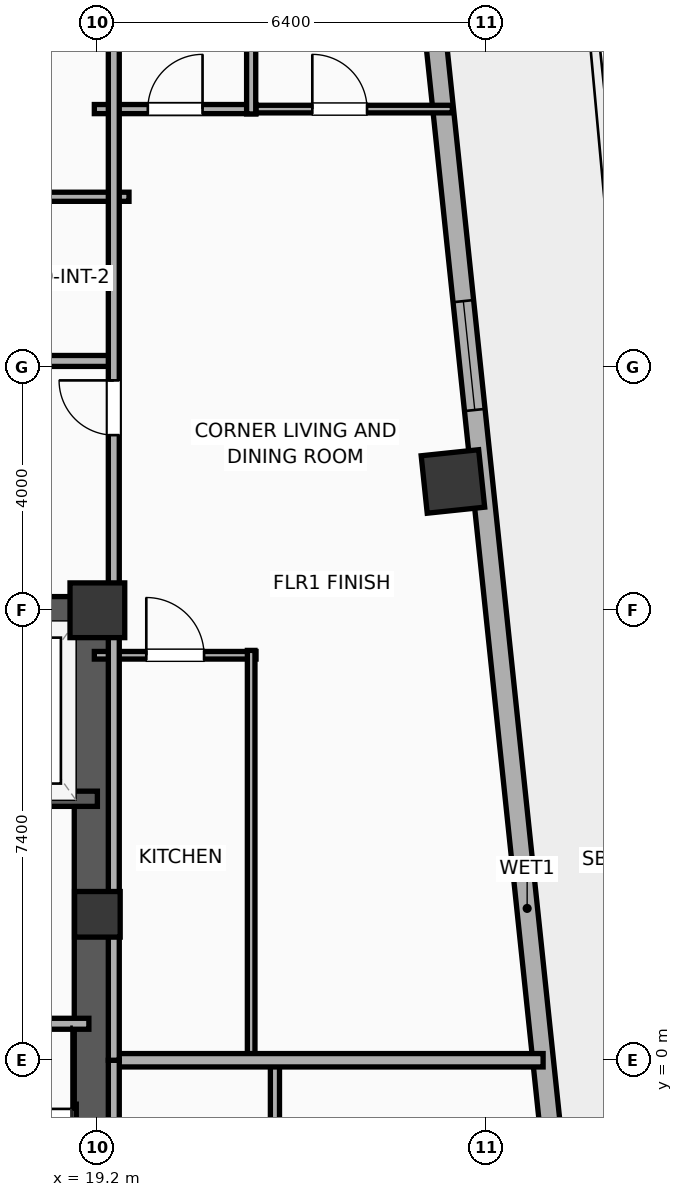
"""IFC4 building model, lengths in metres.
Left out: names, types, materials, properties, quantities, classifications, styles, units other than length and angle.
Written with IfcOpenShell. Run it as: python <this file> out.ifc"""

import sys

from ifc_helpers import new_model, si_unit, direction, frame, frame_2d, origin, origin_2d, place, context, subcontext, project, spatial, rectangle, hollow_rectangle, extrude, element, fill, save


model = new_model("IFC4")
c1 = context("Model", 3, precision=1e-05, world=origin(), true_north=direction((0.0, 1.0)))
c2 = subcontext(c1, "Body", "Model", "MODEL_VIEW")
j1 = project(units=[si_unit("LENGTHUNIT", "METRE"), si_unit("PLANEANGLEUNIT", "RADIAN")], contexts=[c1])
p1 = place(None, origin())
s1 = spatial("IfcSite", under=j1, at=p1, CompositionType="ELEMENT")
p2 = place(p1, origin())
s2 = spatial("IfcBuilding", under=s1, at=p2, CompositionType="ELEMENT")
p3 = place(p2, frame((0.0, 0.0, 171.6)))
s3 = spatial("IfcBuildingStorey", under=s2, at=p3, CompositionType="ELEMENT", Elevation=171.6)
p4 = place(p3, frame((19.2, 2.4, 0.0), z_axis=(0.0, 0.0, 1.0), x_axis=(1.0, 0.0, 0.0)))
e1 = element("IfcColumn", 1, at=p4, inside=s3, PredefinedType="COLUMN", context=c2, shape_type="SweptSolid", body=[
    extrude(rectangle(XDim=0.75, YDim=0.75, at=origin_2d()), origin(), (0.0, 0.0, 1.0), 3.9),
])
p5 = place(p3, frame((19.2, 7.4, 0.0), z_axis=(0.0, 0.0, 1.0), x_axis=(1.0, 0.0, 0.0)))
e2 = element("IfcColumn", 2, at=p5, inside=s3, PredefinedType="COLUMN", context=c2, shape_type="SweptSolid", body=[
    extrude(rectangle(XDim=0.9, YDim=0.9, at=origin_2d()), origin(), (0.0, 0.0, 1.0), 3.9),
])
p6 = place(p3, frame((12.175, 7.4, 0.0), z_axis=(0.0, 0.0, 1.0), x_axis=(1.0, 0.0, 0.0)))
e3 = element("IfcWall", 3, at=p6, inside=s3, PredefinedType="SHEAR", context=c2, shape_type="SweptSolid", body=[
    extrude(rectangle(XDim=7.25, YDim=0.45, at=frame_2d((3.625, 0.0))), origin(), (0.0, 0.0, 1.0), 3.65),
])
p7 = place(p3, frame((19.145, -7.4, 0.0), z_axis=(0.0, 0.0, 1.0), x_axis=(0.0, 1.0, 0.0)))
e4 = element("IfcWall", 4, at=p7, inside=s3, PredefinedType="SHEAR", context=c2, shape_type="SweptSolid", body=[
    extrude(rectangle(XDim=14.8, YDim=0.65, at=frame_2d((7.4, 0.0))), origin(), (0.0, 0.0, 1.0), 3.65),
])
p8 = place(p3, frame((25.047, 9.518, 0.0), z_axis=(0.0, 0.0, 1.0), x_axis=(0.994521895368, 0.104528463268, 0.0)))
e5 = element("IfcColumn", 5, at=p8, inside=s3, PredefinedType="COLUMN", context=c2, shape_type="SweptSolid", body=[
    extrude(hollow_rectangle(XDim=0.95, YDim=0.95, WallThickness=0.032, at=origin_2d()), origin(), (0.0, 0.0, 1.0), 3.9),
])
p9 = place(p3, frame((24.534, 18.99, 0.0), z_axis=(0.0, 0.0, 1.0), x_axis=(0.104534959766, -0.994521212537, 0.0)))
e6 = element("IfcWall", 6, at=p9, inside=s3, PredefinedType="ELEMENTEDWALL", context=c2, shape_type="SweptSolid", body=[
    extrude(rectangle(XDim=33.166, YDim=0.34, at=frame_2d((16.583, 0.0))), origin(), (0.0, 0.0, 1.0), 3.65),
])
p10 = place(p9, frame((6.542, 0.0, 0.75)))
e7 = element("IfcOpeningElement", 7, at=p10, cuts=e6, PredefinedType="OPENING", context=c2, shape_type="SweptSolid", body=[
    extrude(rectangle(XDim=1.8, YDim=2.1, at=frame_2d((0.9, 1.05))), frame((0.0, 0.18, 0.0), z_axis=(0.0, -1.0, 0.0), x_axis=(1.0, 0.0, 0.0)), (0.0, 0.0, 1.0), 0.36),
])
p11 = place(p9, frame((21.84, 0.0, 0.75)))
e8 = element("IfcOpeningElement", 8, at=p11, cuts=e6, PredefinedType="OPENING", context=c2, shape_type="SweptSolid", body=[
    extrude(rectangle(XDim=1.2, YDim=2.05, at=frame_2d((0.6, 1.025))), frame((0.0, 0.18, 0.0), z_axis=(0.0, -1.0, 0.0), x_axis=(1.0, 0.0, 0.0)), (0.0, 0.0, 1.0), 0.36),
])
p12 = place(p3, frame((16.6, 4.3, 0.0), z_axis=(0.0, 0.0, 1.0), x_axis=(1.0, 0.0, 0.0)))
e9 = element("IfcWall", 9, at=p12, inside=s3, PredefinedType="SOLIDWALL", context=c2, shape_type="SweptSolid", body=[
    extrude(rectangle(XDim=2.6, YDim=0.25, at=frame_2d((1.3, 0.0))), origin(), (0.0, 0.0, 1.0), 3.65),
])
p13 = place(p3, frame((15.7, 0.6, 0.0), z_axis=(0.0, 0.0, 1.0), x_axis=(1.0, 0.0, 0.0)))
e10 = element("IfcWall", 10, at=p13, inside=s3, PredefinedType="PARTITIONING", context=c2, shape_type="SweptSolid", body=[
    extrude(rectangle(XDim=3.36, YDim=0.18, at=frame_2d((1.68, 0.0))), origin(), (0.0, 0.0, 1.0), 3.65),
])
p14 = place(p13, frame((1.155, 0.0, 0.0)))
e11 = element("IfcOpeningElement", 11, at=p14, cuts=e10, PredefinedType="OPENING", context=c2, shape_type="SweptSolid", body=[
    extrude(rectangle(XDim=1.05, YDim=2.05, at=frame_2d((0.525, 1.025))), frame((0.0, 0.1, 0.0), z_axis=(0.0, -1.0, 0.0), x_axis=(1.0, 0.0, 0.0)), (0.0, 0.0, 1.0), 0.2),
])
p15 = place(p3, frame((17.136, 14.2, 0.0), z_axis=(0.0, 0.0, 1.0), x_axis=(1.0, 0.0, 0.0)))
e12 = element("IfcWall", 12, at=p15, inside=s3, PredefinedType="PLUMBINGWALL", context=c2, shape_type="SweptSolid", body=[
    extrude(rectangle(XDim=2.584, YDim=0.15, at=frame_2d((1.292, 0.0))), origin(), (0.0, 0.0, 1.0), 3.65),
])
p16 = place(p3, frame((8.08, 11.5, 0.0), z_axis=(0.0, 0.0, 1.0), x_axis=(1.0, 0.0, 0.0)))
e13 = element("IfcWall", 13, at=p16, inside=s3, PredefinedType="PARTITIONING", context=c2, shape_type="SweptSolid", body=[
    extrude(rectangle(XDim=11.42, YDim=0.18, at=frame_2d((5.71, 0.0))), origin(), (0.0, 0.0, 1.0), 3.65),
])
p17 = place(p16, frame((2.562, 0.0, 0.0)))
e14 = element("IfcOpeningElement", 14, at=p17, cuts=e13, PredefinedType="OPENING", context=c2, shape_type="SweptSolid", body=[
    extrude(rectangle(XDim=0.9, YDim=2.05, at=frame_2d((0.45, 1.025))), frame((0.0, 0.1, 0.0), z_axis=(0.0, -1.0, 0.0), x_axis=(1.0, 0.0, 0.0)), (0.0, 0.0, 1.0), 0.2),
])
p18 = place(p16, frame((6.853, 0.0, 0.0)))
e15 = element("IfcOpeningElement", 15, at=p18, cuts=e13, PredefinedType="OPENING", context=c2, shape_type="SweptSolid", body=[
    extrude(rectangle(XDim=1.15, YDim=2.05, at=frame_2d((0.575, 1.025))), frame((0.0, 0.1, 0.0), z_axis=(0.0, -1.0, 0.0), x_axis=(1.0, 0.0, 0.0)), (0.0, 0.0, 1.0), 0.2),
])
p19 = place(p3, frame((22.12, -6.74, 0.0), z_axis=(0.0, 0.0, 1.0), x_axis=(0.0, 1.0, 0.0)))
e16 = element("IfcWall", 16, at=p19, inside=s3, PredefinedType="PLUMBINGWALL", context=c2, shape_type="SweptSolid", body=[
    extrude(rectangle(XDim=6.72, YDim=0.15, at=frame_2d((3.36, 0.0))), origin(), (0.0, 0.0, 1.0), 3.65),
])
p20 = place(p3, frame((21.669, 15.642, 0.0), z_axis=(0.0, 0.0, 1.0), x_axis=(1.0, 0.0, 0.0)))
e17 = element("IfcWall", 17, at=p20, inside=s3, PredefinedType="PARTITIONING", context=c2, shape_type="SweptSolid", body=[
    extrude(rectangle(XDim=3.368, YDim=0.125, at=frame_2d((1.684, 0.0))), origin(), (0.0, 0.0, 1.0), 3.65),
])
p21 = place(p20, frame((1.066, 0.0, 0.0)))
e18 = element("IfcOpeningElement", 18, at=p21, cuts=e17, PredefinedType="OPENING", context=c2, shape_type="SweptSolid", body=[
    extrude(rectangle(XDim=0.9, YDim=2.05, at=frame_2d((0.45, 1.025))), frame((0.0, 0.073, 0.0), z_axis=(0.0, -1.0, 0.0), x_axis=(1.0, 0.0, 0.0)), (0.0, 0.0, 1.0), 0.145),
])
p22 = place(p3, frame((19.15, 6.66, 0.0), z_axis=(0.0, 0.0, 1.0), x_axis=(1.0, 0.0, 0.0)))
e19 = element("IfcWall", 19, at=p22, inside=s3, PredefinedType="PARTITIONING", context=c2, shape_type="SweptSolid", body=[
    extrude(rectangle(XDim=2.659, YDim=0.125, at=frame_2d((1.33, 0.0))), origin(), (0.0, 0.0, 1.0), 3.65),
])
p23 = place(p22, frame((0.854, 0.0, 0.0)))
e20 = element("IfcOpeningElement", 20, at=p23, cuts=e19, PredefinedType="OPENING", context=c2, shape_type="SweptSolid", body=[
    extrude(rectangle(XDim=0.95, YDim=2.05, at=frame_2d((0.475, 1.025))), frame((0.0, 0.073, 0.0), z_axis=(0.0, -1.0, 0.0), x_axis=(1.0, 0.0, 0.0)), (0.0, 0.0, 1.0), 0.145),
])
p24 = place(p3, frame((19.15, 15.642, 0.0), z_axis=(0.0, 0.0, 1.0), x_axis=(1.0, 0.0, 0.0)))
e21 = element("IfcWall", 21, at=p24, inside=s3, PredefinedType="PLUMBINGWALL", context=c2, shape_type="SweptSolid", body=[
    extrude(rectangle(XDim=2.659, YDim=0.15, at=frame_2d((1.33, 0.0))), origin(), (0.0, 0.0, 1.0), 3.65),
])
p25 = place(p24, frame((0.879, 0.0, 0.0)))
e22 = element("IfcOpeningElement", 22, at=p25, cuts=e21, PredefinedType="OPENING", context=c2, shape_type="SweptSolid", body=[
    extrude(rectangle(XDim=0.9, YDim=2.05, at=frame_2d((0.45, 1.025))), frame((0.0, 0.085, 0.0), z_axis=(0.0, -1.0, 0.0), x_axis=(1.0, 0.0, 0.0)), (0.0, 0.0, 1.0), 0.17),
])
p26 = place(p3, frame((21.729, 0.02, 0.0), z_axis=(0.0, 0.0, 1.0), x_axis=(0.0, 1.0, 0.0)))
e23 = element("IfcWall", 23, at=p26, inside=s3, PredefinedType="PARTITIONING", context=c2, shape_type="SweptSolid", body=[
    extrude(rectangle(XDim=6.72, YDim=0.125, at=frame_2d((3.36, 0.0))), origin(), (0.0, 0.0, 1.0), 3.65),
])
p27 = place(p3, frame((21.729, 15.562, 0.0), z_axis=(0.0, 0.0, 1.0), x_axis=(0.0, 1.0, 0.0)))
e24 = element("IfcWall", 24, at=p27, inside=s3, PredefinedType="PLUMBINGWALL", context=c2, shape_type="SweptSolid", body=[
    extrude(rectangle(XDim=6.713, YDim=0.15, at=frame_2d((3.357, 0.0))), origin(), (0.0, 0.0, 1.0), 3.04),
])
p28 = place(p3, frame((19.47, 0.0, 0.0), z_axis=(0.0, 0.0, 1.0), x_axis=(1.0, 0.0, 0.0)))
e25 = element("IfcWall", 25, at=p28, inside=s3, PredefinedType="PARTITIONING", context=c2, shape_type="SweptSolid", body=[
    extrude(rectangle(XDim=7.06, YDim=0.22, at=frame_2d((3.53, 0.0))), origin(), (0.0, 0.0, 1.0), 3.65),
])
p29 = place(p3, frame((19.47, -18.559, 0.0), z_axis=(0.0, 0.0, 1.0), x_axis=(0.0, 1.0, 0.0)))
e26 = element("IfcWall", 26, at=p29, inside=s3, PredefinedType="PARTITIONING", context=c2, shape_type="SweptSolid", body=[
    extrude(rectangle(XDim=18.559, YDim=0.18, at=frame_2d((9.279, 0.0))), origin(), (0.0, 0.0, 1.0), 3.65),
])
p30 = place(p29, frame((7.378, 0.0, 0.0)))
e27 = element("IfcOpeningElement", 27, at=p30, cuts=e26, PredefinedType="OPENING", context=c2, shape_type="SweptSolid", body=[
    extrude(rectangle(XDim=0.9, YDim=2.05, at=frame_2d((0.45, 1.025))), frame((0.0, 0.1, 0.0), z_axis=(0.0, -1.0, 0.0), x_axis=(1.0, 0.0, 0.0)), (0.0, 0.0, 1.0), 0.2),
])
p31 = place(p3, frame((19.47, 0.0, 0.0), z_axis=(0.0, 0.0, 1.0), x_axis=(0.0, 1.0, 0.0)))
e28 = element("IfcWall", 28, at=p31, inside=s3, PredefinedType="PARTITIONING", context=c2, shape_type="SweptSolid", body=[
    extrude(rectangle(XDim=22.124, YDim=0.18, at=frame_2d((11.062, 0.0))), origin(), (0.0, 0.0, 1.0), 3.04),
])
p32 = place(p31, frame((10.28, 0.0, 0.0)))
e29 = element("IfcOpeningElement", 29, at=p32, cuts=e28, PredefinedType="OPENING", context=c2, shape_type="SweptSolid", body=[
    extrude(rectangle(XDim=0.9, YDim=2.05, at=frame_2d((0.45, 1.025))), frame((0.0, 0.1, 0.0), z_axis=(0.0, -1.0, 0.0), x_axis=(1.0, 0.0, 0.0)), (0.0, 0.0, 1.0), 0.2),
])
p33 = place(p10, origin())
e30 = element("IfcWindow", 30, at=p33, inside=s3, PartitioningType="SINGLE_PANEL", PredefinedType="WINDOW", context=c2, shape_type="SweptSolid", body=[
    extrude(rectangle(XDim=1.8, YDim=2.1, at=frame_2d((0.9, 1.05))), frame((0.0, 0.03, 0.0), z_axis=(0.0, -1.0, 0.0), x_axis=(1.0, 0.0, 0.0)), (0.0, 0.0, 1.0), 0.06),
])
fill(e7, e30)
p34 = place(p21, origin())
e31 = element("IfcDoor", 31, at=p34, inside=s3, OperationType="SINGLE_SWING_LEFT", PredefinedType="DOOR", context=c2, shape_type="SweptSolid", body=[
    extrude(rectangle(XDim=0.9, YDim=2.05, at=frame_2d((0.45, 1.025))), frame((0.0, 0.025, 0.0), z_axis=(0.0, -1.0, 0.0), x_axis=(1.0, 0.0, 0.0)), (0.0, 0.0, 1.0), 0.05),
])
fill(e18, e31)
p35 = place(p23, origin())
e32 = element("IfcDoor", 32, at=p35, inside=s3, OperationType="SINGLE_SWING_LEFT", PredefinedType="DOOR", context=c2, shape_type="SweptSolid", body=[
    extrude(rectangle(XDim=0.95, YDim=2.05, at=frame_2d((0.475, 1.025))), frame((0.0, 0.025, 0.0), z_axis=(0.0, -1.0, 0.0), x_axis=(1.0, 0.0, 0.0)), (0.0, 0.0, 1.0), 0.05),
])
fill(e20, e32)
p36 = place(p25, origin())
e33 = element("IfcDoor", 33, at=p36, inside=s3, OperationType="SINGLE_SWING_RIGHT", PredefinedType="DOOR", context=c2, shape_type="SweptSolid", body=[
    extrude(rectangle(XDim=0.9, YDim=2.05, at=frame_2d((0.45, 1.025))), frame((0.0, 0.025, 0.0), z_axis=(0.0, -1.0, 0.0), x_axis=(1.0, 0.0, 0.0)), (0.0, 0.0, 1.0), 0.05),
])
fill(e22, e33)
p37 = place(p32, origin())
e34 = element("IfcDoor", 34, at=p37, inside=s3, OperationType="SINGLE_SWING_RIGHT", PredefinedType="DOOR", context=c2, shape_type="SweptSolid", body=[
    extrude(rectangle(XDim=0.9, YDim=2.05, at=frame_2d((0.45, 1.025))), frame((0.0, 0.025, 0.0), z_axis=(0.0, -1.0, 0.0), x_axis=(1.0, 0.0, 0.0)), (0.0, 0.0, 1.0), 0.05),
])
fill(e29, e34)
save(model, sys.argv[1])
